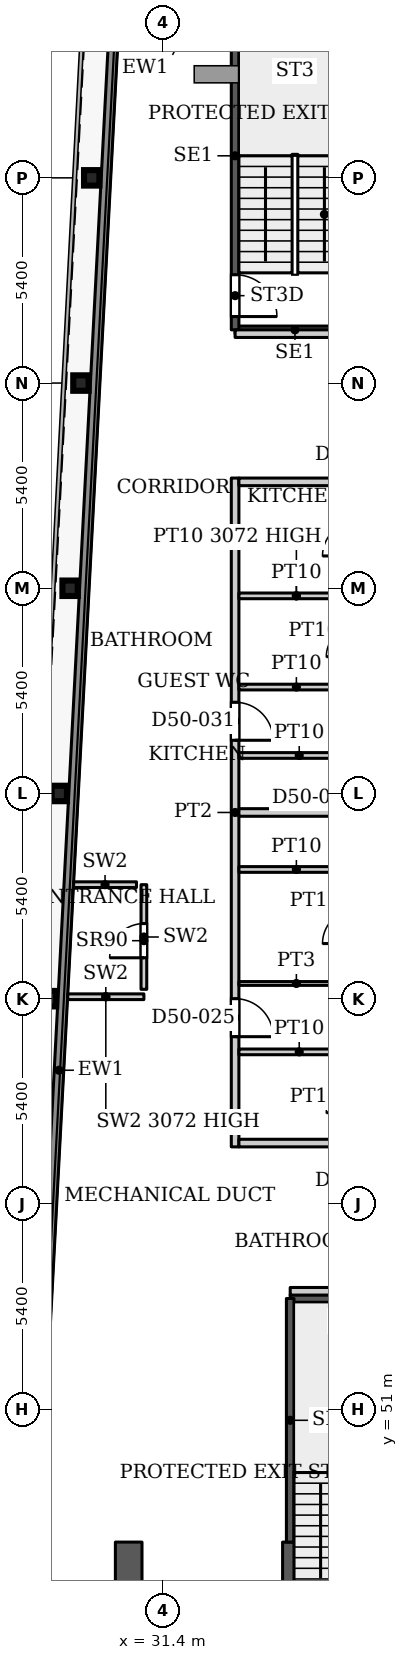
"""IFC4 building model, lengths in metres.
Left out: names, types, materials, properties, quantities, classifications, styles, units other than length and angle.
Written with IfcOpenShell. Run it as: python <this file> out.ifc"""

import sys

from ifc_helpers import new_model, si_unit, direction, frame, frame_2d, origin, origin_2d, place, context, subcontext, project, spatial, rectangle, i_section, extrude, source, transform, mapped, element, fill, save


model = new_model("IFC4")
c1 = context("Model", 3, precision=1e-05, world=origin(), true_north=direction((0.0, 1.0)))
c2 = subcontext(c1, "Body", "Model", "MODEL_VIEW")
j1 = project(units=[si_unit("LENGTHUNIT", "METRE"), si_unit("PLANEANGLEUNIT", "RADIAN")], contexts=[c1])
p1 = place(None, origin())
s1 = spatial("IfcSite", under=j1, at=p1, CompositionType="ELEMENT")
p2 = place(p1, origin())
s2 = spatial("IfcBuilding", under=s1, at=p2, CompositionType="ELEMENT")
p3 = place(p2, frame((0.0, 0.0, 220.1)))
s3 = spatial("IfcBuildingStorey", under=s2, at=p3, CompositionType="ELEMENT", Elevation=220.1)
for number, where, z_axis, x_axis in (
    (1, (28.39, 61.8, 0.0), (0.0, 0.0, 1.0), (1.0, 0.0, 0.0)),
    (2, (28.674, 67.2, 0.0), (0.0, 0.0, 1.0), (1.0, 0.0, 0.0)),
    (3, (28.958, 72.6, 0.0), (0.0, 0.0, 1.0), (1.0, 0.0, 0.0)),
    (4, (29.243, 78.0, 0.0), (0.0, 0.0, 1.0), (1.0, 0.0, 0.0)),
    (5, (29.527, 83.4, 0.0), (0.0, 0.0, 1.0), (1.0, 0.0, 0.0)),
):
    element("IfcColumn", number, at=place(p3, frame(where, z_axis=z_axis, x_axis=x_axis)), inside=s3, PredefinedType="COLUMN", context=c2, shape_type="SweptSolid", body=[
        extrude(i_section(OverallWidth=0.404, OverallDepth=0.407, WebThickness=0.027, FlangeThickness=0.044, FilletRadius=0.012, at=origin_2d()), origin(), (0.0, 0.0, 1.0), 3.9),
    ])
p4 = place(p3, frame((34.75, 29.05, 0.0), z_axis=(0.0, 0.0, 1.0), x_axis=(0.0, 1.0, 0.0)))
e6 = element("IfcWall", 6, at=p4, inside=s3, PredefinedType="SHEAR", context=c2, shape_type="SweptSolid", body=[
    extrude(rectangle(XDim=18.45, YDim=0.4, at=frame_2d((9.225, 0.0))), origin(), (0.0, 0.0, 1.0), 3.9),
])
p5 = place(p4, frame((8.025, 0.0, 0.0)))
e7 = element("IfcOpeningElement", 7, at=p5, cuts=e6, PredefinedType="OPENING", context=c2, shape_type="SweptSolid", body=[
    extrude(rectangle(XDim=1.1, YDim=2.2, at=frame_2d((0.55, 1.1))), frame((0.0, 0.21, 0.0), z_axis=(0.0, -1.0, 0.0), x_axis=(1.0, 0.0, 0.0)), (0.0, 0.0, 1.0), 0.42),
])
p6 = place(p4, frame((10.875, 0.0, 0.0)))
e8 = element("IfcOpeningElement", 8, at=p6, cuts=e6, PredefinedType="OPENING", context=c2, shape_type="SweptSolid", body=[
    extrude(rectangle(XDim=1.1, YDim=2.2, at=frame_2d((0.55, 1.1))), frame((0.0, 0.21, 0.0), z_axis=(0.0, -1.0, 0.0), x_axis=(1.0, 0.0, 0.0)), (0.0, 0.0, 1.0), 0.42),
])
p7 = place(p4, frame((13.725, 0.0, 0.0)))
e9 = element("IfcOpeningElement", 9, at=p7, cuts=e6, PredefinedType="OPENING", context=c2, shape_type="SweptSolid", body=[
    extrude(rectangle(XDim=1.1, YDim=2.2, at=frame_2d((0.55, 1.1))), frame((0.0, 0.21, 0.0), z_axis=(0.0, -1.0, 0.0), x_axis=(1.0, 0.0, 0.0)), (0.0, 0.0, 1.0), 0.42),
])
p8 = place(p4, frame((15.95, 0.0, 0.0)))
e10 = element("IfcOpeningElement", 10, at=p8, cuts=e6, PredefinedType="OPENING", context=c2, shape_type="SweptSolid", body=[
    extrude(rectangle(XDim=1.1, YDim=2.2, at=frame_2d((0.55, 1.1))), frame((0.0, 0.21, 0.0), z_axis=(0.0, -1.0, 0.0), x_axis=(1.0, 0.0, 0.0)), (0.0, 0.0, 1.0), 0.42),
])
p9 = place(p3, frame((30.5, 29.05, 0.0), z_axis=(0.0, 0.0, 1.0), x_axis=(0.0, 1.0, 0.0)))
e11 = element("IfcWall", 11, at=p9, inside=s3, PredefinedType="SHEAR", context=c2, shape_type="SweptSolid", body=[
    extrude(rectangle(XDim=18.45, YDim=0.7, at=frame_2d((9.225, 0.0))), origin(), (0.0, 0.0, 1.0), 3.9),
])
p10 = place(p9, frame((6.21, 0.0, 0.0)))
e12 = element("IfcOpeningElement", 12, at=p10, cuts=e11, PredefinedType="OPENING", context=c2, shape_type="SweptSolid", body=[
    extrude(rectangle(XDim=0.9, YDim=2.2, at=frame_2d((0.45, 1.1))), frame((0.0, 0.36, 0.0), z_axis=(0.0, -1.0, 0.0), x_axis=(1.0, 0.0, 0.0)), (0.0, 0.0, 1.0), 0.72),
])
p11 = place(p9, frame((10.684, 0.0, 0.0)))
e13 = element("IfcOpeningElement", 13, at=p11, cuts=e11, PredefinedType="OPENING", context=c2, shape_type="SweptSolid", body=[
    extrude(rectangle(XDim=0.9, YDim=2.2, at=frame_2d((0.45, 1.1))), frame((0.0, 0.36, 0.0), z_axis=(0.0, -1.0, 0.0), x_axis=(1.0, 0.0, 0.0)), (0.0, 0.0, 1.0), 0.72),
])
p12 = place(p3, frame((27.195, 31.969, 0.0), z_axis=(0.0, 0.0, 1.0), x_axis=(0.052559748861, 0.998617781135, 0.0)))
e14 = element("IfcWall", 14, at=p12, inside=s3, PredefinedType="SOLIDWALL", context=c2, shape_type="SweptSolid", body=[
    extrude(rectangle(XDim=55.972, YDim=0.25, at=frame_2d((27.986, 0.0))), origin(), (0.0, 0.0, 1.0), 3.75),
])
p13 = place(p3, frame((34.75, 53.91, 0.0), z_axis=(0.0, 0.0, 1.0), x_axis=(1.0, 0.0, 0.0)))
e15 = element("IfcWall", 15, at=p13, inside=s3, PredefinedType="SHEAR", context=c2, shape_type="SweptSolid", body=[
    extrude(rectangle(XDim=3.15, YDim=0.2, at=frame_2d((1.575, 0.0))), origin(), (0.0, 0.0, 1.0), 3.9),
])
p14 = place(p3, frame((34.75, 47.5, 0.0), z_axis=(0.0, 0.0, 1.0), x_axis=(0.0, 1.0, 0.0)))
e16 = element("IfcWall", 16, at=p14, inside=s3, PredefinedType="SHEAR", context=c2, shape_type="SweptSolid", body=[
    extrude(rectangle(XDim=6.41, YDim=0.2, at=frame_2d((3.205, 0.0))), origin(), (0.0, 0.0, 1.0), 3.9),
])
p15 = place(p3, frame((33.3, 79.4, 0.0), z_axis=(0.0, 0.0, 1.0), x_axis=(1.0, 0.0, 0.0)))
e17 = element("IfcWall", 17, at=p15, inside=s3, PredefinedType="SHEAR", context=c2, shape_type="SweptSolid", body=[
    extrude(rectangle(XDim=3.15, YDim=0.2, at=frame_2d((1.575, 0.0))), origin(), (0.0, 0.0, 1.0), 3.9),
])
p16 = place(p3, frame((33.3, 79.4, 0.0), z_axis=(0.0, 0.0, 1.0), x_axis=(0.0, 1.0, 0.0)))
e18 = element("IfcWall", 18, at=p16, inside=s3, PredefinedType="SHEAR", context=c2, shape_type="SweptSolid", body=[
    extrude(rectangle(XDim=9.16, YDim=0.2, at=frame_2d((4.58, 0.0))), origin(), (0.0, 0.0, 1.0), 3.9),
])
p17 = place(p16, frame((0.35, 0.0, 0.0)))
e19 = element("IfcOpeningElement", 19, at=p17, cuts=e18, PredefinedType="OPENING", context=c2, shape_type="SweptSolid", body=[
    extrude(rectangle(XDim=1.1, YDim=2.2, at=frame_2d((0.55, 1.1))), frame((0.0, 0.11, 0.0), z_axis=(0.0, -1.0, 0.0), x_axis=(1.0, 0.0, 0.0)), (0.0, 0.0, 1.0), 0.22),
])
p18 = place(p3, frame((28.896, 61.851, 0.0), z_axis=(0.0, 0.0, 1.0), x_axis=(1.0, 0.0, 0.0)))
e20 = element("IfcWall", 20, at=p18, inside=s3, PredefinedType="PARTITIONING", context=c2, shape_type="SweptSolid", body=[
    extrude(rectangle(XDim=2.004, YDim=0.15, at=frame_2d((1.002, 0.0))), origin(), (0.0, 0.0, 1.0), 3.072),
])
p19 = place(p3, frame((30.9, 62.046, 0.0), z_axis=(0.0, 0.0, 1.0), x_axis=(0.0, 1.0, 0.0)))
e21 = element("IfcWall", 21, at=p19, inside=s3, PredefinedType="PARTITIONING", context=c2, shape_type="SweptSolid", body=[
    extrude(rectangle(XDim=2.754, YDim=0.15, at=frame_2d((1.377, 0.0))), origin(), (0.0, 0.0, 1.0), 3.9),
])
p20 = place(p19, frame((0.83, 0.0, 0.0)))
e22 = element("IfcOpeningElement", 22, at=p20, cuts=e21, PredefinedType="OPENING", context=c2, shape_type="SweptSolid", body=[
    extrude(rectangle(XDim=0.9, YDim=2.2, at=frame_2d((0.45, 1.1))), frame((0.0, 0.085, 0.0), z_axis=(0.0, -1.0, 0.0), x_axis=(1.0, 0.0, 0.0)), (0.0, 0.0, 1.0), 0.17),
])
p21 = place(p3, frame((29.051, 64.8, 0.0), z_axis=(0.0, 0.0, 1.0), x_axis=(1.0, 0.0, 0.0)))
e23 = element("IfcWall", 23, at=p21, inside=s3, PredefinedType="PARTITIONING", context=c2, shape_type="SweptSolid", body=[
    extrude(rectangle(XDim=1.654, YDim=0.15, at=frame_2d((0.827, 0.0))), origin(), (0.0, 0.0, 1.0), 3.9),
])
p22 = place(p3, frame((33.3, 57.9, 0.0), z_axis=(0.0, 0.0, 1.0), x_axis=(0.0, 1.0, 0.0)))
e24 = element("IfcWall", 24, at=p22, inside=s3, PredefinedType="PARTITIONING", context=c2, shape_type="SweptSolid", body=[
    extrude(rectangle(XDim=17.6, YDim=0.2, at=frame_2d((8.8, 0.0))), origin(), (0.0, 0.0, 1.0), 3.6),
])
p23 = place(p22, frame((2.9, 0.0, 0.0)))
e25 = element("IfcOpeningElement", 25, at=p23, cuts=e24, PredefinedType="OPENING", context=c2, shape_type="SweptSolid", body=[
    extrude(rectangle(XDim=1.0, YDim=2.1, at=frame_2d((0.5, 1.05))), frame((0.0, 0.11, 0.0), z_axis=(0.0, -1.0, 0.0), x_axis=(1.0, 0.0, 0.0)), (0.0, 0.0, 1.0), 0.22),
])
p24 = place(p22, frame((10.7, 0.0, 0.0)))
e26 = element("IfcOpeningElement", 26, at=p24, cuts=e24, PredefinedType="OPENING", context=c2, shape_type="SweptSolid", body=[
    extrude(rectangle(XDim=1.0, YDim=2.1, at=frame_2d((0.5, 1.05))), frame((0.0, 0.11, 0.0), z_axis=(0.0, -1.0, 0.0), x_axis=(1.0, 0.0, 0.0)), (0.0, 0.0, 1.0), 0.22),
])
p25 = place(p3, frame((33.3, 79.3, 0.0), z_axis=(0.0, 0.0, 1.0), x_axis=(1.0, 0.0, 0.0)))
e27 = element("IfcWall", 27, at=p25, inside=s3, PredefinedType="PARTITIONING", context=c2, shape_type="SweptSolid", body=[
    extrude(rectangle(XDim=12.6, YDim=0.2, at=frame_2d((6.3, 0.0))), origin(), (0.0, 0.0, 1.0), 3.6),
])
p26 = place(p25, frame((5.795, 0.0, 0.0)))
e28 = element("IfcOpeningElement", 28, at=p26, cuts=e27, PredefinedType="OPENING", context=c2, shape_type="SweptSolid", body=[
    extrude(rectangle(XDim=1.0, YDim=2.1, at=frame_2d((0.5, 1.05))), frame((0.0, 0.11, 0.0), z_axis=(0.0, -1.0, 0.0), x_axis=(1.0, 0.0, 0.0)), (0.0, 0.0, 1.0), 0.22),
])
p27 = place(p3, frame((33.4, 58.0, 0.0), z_axis=(0.0, 0.0, 1.0), x_axis=(1.0, 0.0, 0.0)))
e29 = element("IfcWall", 29, at=p27, inside=s3, PredefinedType="PARTITIONING", context=c2, shape_type="SweptSolid", body=[
    extrude(rectangle(XDim=12.5, YDim=0.2, at=frame_2d((6.25, 0.0))), origin(), (0.0, 0.0, 1.0), 3.6),
])
p28 = place(p3, frame((33.4, 60.4, 0.0), z_axis=(0.0, 0.0, 1.0), x_axis=(1.0, 0.0, 0.0)))
e30 = element("IfcWall", 30, at=p28, inside=s3, PredefinedType="PARTITIONING", context=c2, shape_type="SweptSolid", body=[
    extrude(rectangle(XDim=3.175, YDim=0.15, at=frame_2d((1.587, 0.0))), origin(), (0.0, 0.0, 1.0), 3.6),
])
p29 = place(p3, frame((33.4, 62.2, 0.0), z_axis=(0.0, 0.0, 1.0), x_axis=(1.0, 0.0, 0.0)))
e31 = element("IfcWall", 31, at=p29, inside=s3, PredefinedType="PARTITIONING", context=c2, shape_type="SweptSolid", body=[
    extrude(rectangle(XDim=3.025, YDim=0.1, at=frame_2d((1.513, 0.0))), origin(), (0.0, 0.0, 1.0), 3.6),
])
p30 = place(p3, frame((33.4, 65.2, 0.0), z_axis=(0.0, 0.0, 1.0), x_axis=(1.0, 0.0, 0.0)))
e32 = element("IfcWall", 32, at=p30, inside=s3, PredefinedType="PARTITIONING", context=c2, shape_type="SweptSolid", body=[
    extrude(rectangle(XDim=3.025, YDim=0.15, at=frame_2d((1.513, 0.0))), origin(), (0.0, 0.0, 1.0), 3.6),
])
p31 = place(p3, frame((33.4, 66.7, 0.0), z_axis=(0.0, 0.0, 1.0), x_axis=(1.0, 0.0, 0.0)))
e33 = element("IfcWall", 33, at=p31, inside=s3, PredefinedType="PARTITIONING", context=c2, shape_type="SweptSolid", body=[
    extrude(rectangle(XDim=12.5, YDim=0.2, at=frame_2d((6.25, 0.0))), origin(), (0.0, 0.0, 1.0), 3.6),
])
p32 = place(p3, frame((33.4, 68.2, 0.0), z_axis=(0.0, 0.0, 1.0), x_axis=(1.0, 0.0, 0.0)))
e34 = element("IfcWall", 34, at=p32, inside=s3, PredefinedType="PARTITIONING", context=c2, shape_type="SweptSolid", body=[
    extrude(rectangle(XDim=3.175, YDim=0.15, at=frame_2d((1.587, 0.0))), origin(), (0.0, 0.0, 1.0), 3.6),
])
p33 = place(p3, frame((33.4, 70.0, 0.0), z_axis=(0.0, 0.0, 1.0), x_axis=(1.0, 0.0, 0.0)))
e35 = element("IfcWall", 35, at=p33, inside=s3, PredefinedType="PARTITIONING", context=c2, shape_type="SweptSolid", body=[
    extrude(rectangle(XDim=3.025, YDim=0.15, at=frame_2d((1.513, 0.0))), origin(), (0.0, 0.0, 1.0), 3.6),
])
p34 = place(p3, frame((33.4, 72.4, 0.0), z_axis=(0.0, 0.0, 1.0), x_axis=(1.0, 0.0, 0.0)))
e36 = element("IfcWall", 36, at=p34, inside=s3, PredefinedType="PARTITIONING", context=c2, shape_type="SweptSolid", body=[
    extrude(rectangle(XDim=3.025, YDim=0.15, at=frame_2d((1.513, 0.0))), origin(), (0.0, 0.0, 1.0), 3.072),
])
p35 = place(p3, frame((33.4, 75.4, 0.0), z_axis=(0.0, 0.0, 1.0), x_axis=(1.0, 0.0, 0.0)))
e37 = element("IfcWall", 37, at=p35, inside=s3, PredefinedType="PARTITIONING", context=c2, shape_type="SweptSolid", body=[
    extrude(rectangle(XDim=12.5, YDim=0.2, at=frame_2d((6.25, 0.0))), origin(), (0.0, 0.0, 1.0), 3.6),
])
p36 = place(p3, frame((34.75, 54.1, 0.0), z_axis=(0.0, 0.0, 1.0), x_axis=(1.0, 0.0, 0.0)))
e38 = element("IfcWall", 38, at=p36, inside=s3, PredefinedType="PARTITIONING", context=c2, shape_type="SweptSolid", body=[
    extrude(rectangle(XDim=11.15, YDim=0.2, at=frame_2d((5.575, 0.0))), origin(), (0.0, 0.0, 1.0), 3.6),
])
p37 = place(p36, frame((5.075, 0.0, 0.0)))
e39 = element("IfcOpeningElement", 39, at=p37, cuts=e38, PredefinedType="OPENING", context=c2, shape_type="SweptSolid", body=[
    extrude(rectangle(XDim=1.0, YDim=2.1, at=frame_2d((0.5, 1.05))), frame((0.0, 0.11, 0.0), z_axis=(0.0, -1.0, 0.0), x_axis=(1.0, 0.0, 0.0)), (0.0, 0.0, 1.0), 0.22),
])
m1 = source(origin(), c2, "Body", "SweptSolid", [
    extrude(rectangle(XDim=0.9, YDim=2.2, at=frame_2d((0.45, 1.1))), frame((0.0, 0.025, 0.0), z_axis=(0.0, -1.0, 0.0), x_axis=(1.0, 0.0, 0.0)), (0.0, 0.0, 1.0), 0.05),
])
p38 = place(p20, origin())
e40 = element("IfcDoor", 40, at=p38, inside=s3, OperationType="SINGLE_SWING_LEFT", PredefinedType="DOOR", context=c2, shape_type="MappedRepresentation", body=[
    mapped(m1, transform((0.0, 0.0, 0.0), x_axis=(1.0, 0.0, 0.0), y_axis=(0.0, 1.0, 0.0), z_axis=(0.0, 0.0, 1.0), scale=1.0)),
])
fill(e22, e40)
m2 = source(origin(), c2, "Body", "SweptSolid", [
    extrude(rectangle(XDim=1.1, YDim=2.2, at=frame_2d((0.55, 1.1))), frame((0.0, 0.025, 0.0), z_axis=(0.0, -1.0, 0.0), x_axis=(1.0, 0.0, 0.0)), (0.0, 0.0, 1.0), 0.05),
])
p39 = place(p17, origin())
e41 = element("IfcDoor", 41, at=p39, inside=s3, OperationType="SINGLE_SWING_RIGHT", PredefinedType="DOOR", context=c2, shape_type="MappedRepresentation", body=[
    mapped(m2, transform((0.0, 0.0, 0.0), x_axis=(1.0, 0.0, 0.0), y_axis=(0.0, 1.0, 0.0), z_axis=(0.0, 0.0, 1.0), scale=1.0)),
])
fill(e19, e41)
m3 = source(origin(), c2, "Body", "SweptSolid", [
    extrude(rectangle(XDim=1.0, YDim=2.1, at=frame_2d((0.5, 1.05))), frame((0.0, 0.025, 0.0), z_axis=(0.0, -1.0, 0.0), x_axis=(1.0, 0.0, 0.0)), (0.0, 0.0, 1.0), 0.05),
])
p40 = place(p23, origin())
e42 = element("IfcDoor", 42, at=p40, inside=s3, OperationType="SINGLE_SWING_RIGHT", PredefinedType="DOOR", context=c2, shape_type="MappedRepresentation", body=[
    mapped(m3, transform((0.0, 0.0, 0.0), x_axis=(1.0, 0.0, 0.0), y_axis=(0.0, 1.0, 0.0), z_axis=(0.0, 0.0, 1.0), scale=1.0)),
])
fill(e25, e42)
p41 = place(p24, origin())
e43 = element("IfcDoor", 43, at=p41, inside=s3, OperationType="SINGLE_SWING_RIGHT", PredefinedType="DOOR", context=c2, shape_type="MappedRepresentation", body=[
    mapped(m3, transform((0.0, 0.0, 0.0), x_axis=(1.0, 0.0, 0.0), y_axis=(0.0, 1.0, 0.0), z_axis=(0.0, 0.0, 1.0), scale=1.0)),
])
fill(e26, e43)
save(model, sys.argv[1])
